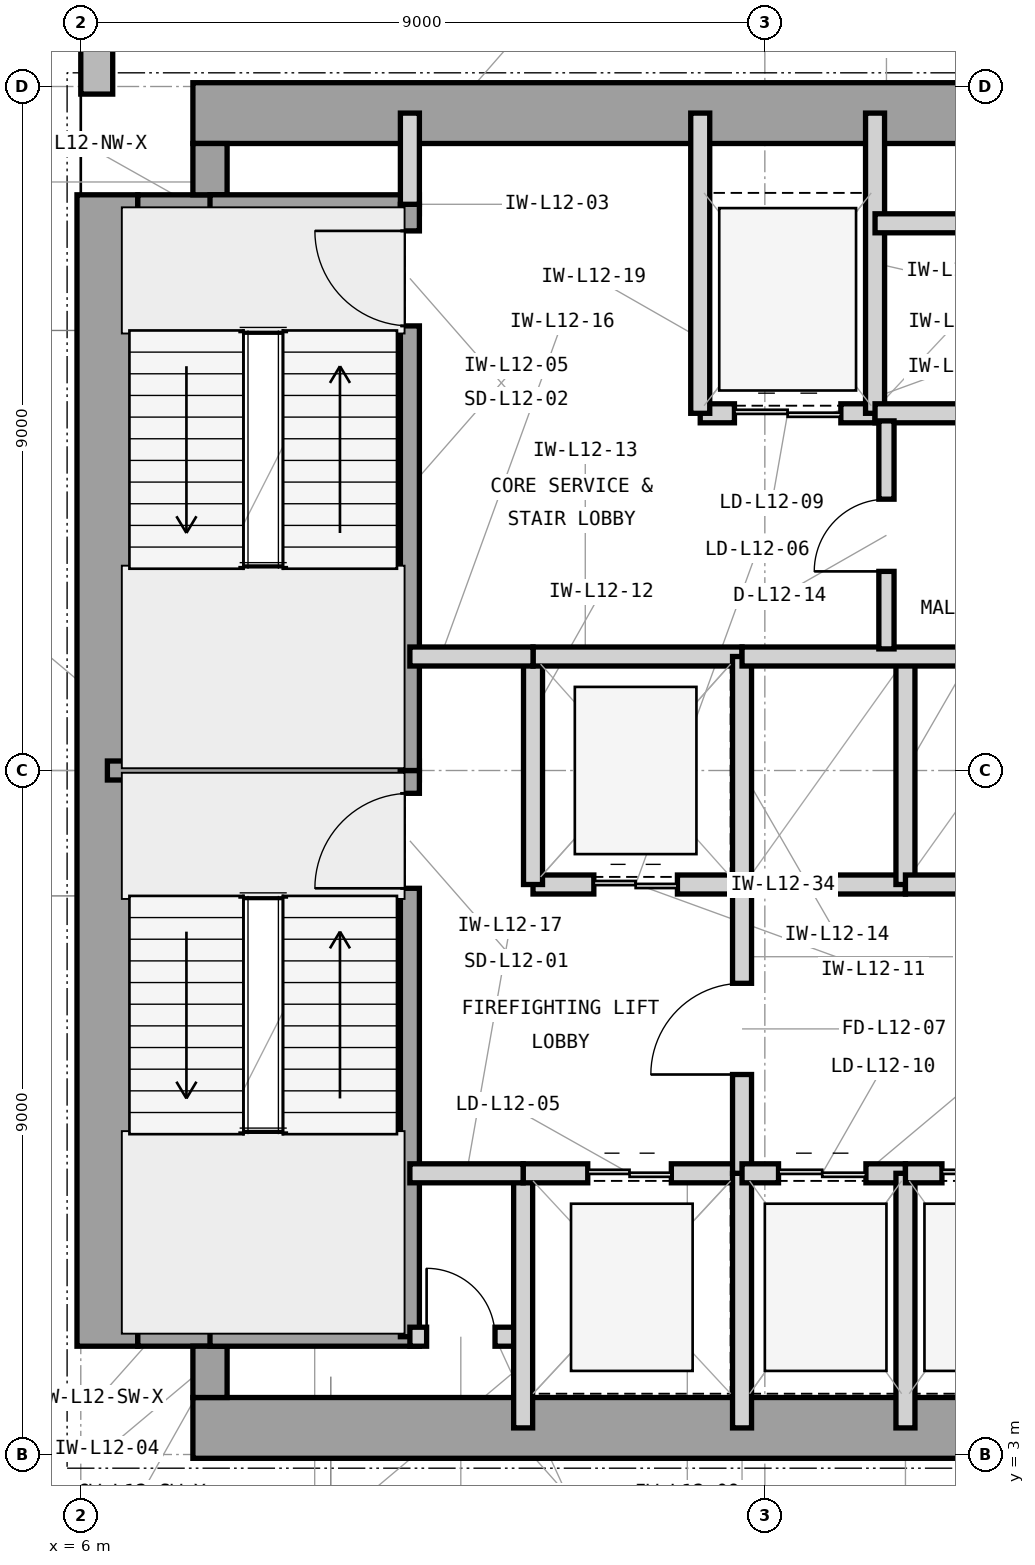
"""IFC4 building model, lengths in metres.
Left out: names, types, materials, properties, quantities, classifications, styles, units other than length and angle.
Written with IfcOpenShell. Run it as: python <this file> out.ifc"""

import sys

from ifc_helpers import new_model, si_unit, direction, frame, frame_2d, origin, place, context, subcontext, project, spatial, rectangle, extrude, element, fill, save


model = new_model("IFC4")
c1 = context("Model", 3, precision=1e-05, world=origin(), true_north=direction((0.0, 1.0)))
c2 = subcontext(c1, "Body", "Model", "MODEL_VIEW")
j1 = project(units=[si_unit("LENGTHUNIT", "METRE"), si_unit("PLANEANGLEUNIT", "RADIAN")], contexts=[c1])
p1 = place(None, origin())
s1 = spatial("IfcSite", under=j1, at=p1, CompositionType="ELEMENT")
p2 = place(p1, origin())
s2 = spatial("IfcBuilding", under=s1, at=p2, CompositionType="ELEMENT")
p3 = place(p2, frame((0.0, 0.0, 55.2)))
s3 = spatial("IfcBuildingStorey", under=s2, at=p3, CompositionType="ELEMENT", Elevation=55.2)
p4 = place(p3, frame((7.475, 3.35, 0.0), z_axis=(0.0, 0.0, 1.0), x_axis=(1.0, 0.0, 0.0)))
e1 = element("IfcWall", 1, at=p4, inside=s3, PredefinedType="SHEAR", context=c2, shape_type="SweptSolid", body=[
    extrude(rectangle(XDim=16.575, YDim=0.8, at=frame_2d((8.288, 0.0))), origin(), (0.0, 0.0, 1.0), 4.2),
])
p5 = place(p3, frame((6.35, 4.425, 0.0), z_axis=(0.0, 0.0, 1.0), x_axis=(0.0, 1.0, 0.0)))
e2 = element("IfcWall", 2, at=p5, inside=s3, PredefinedType="SHEAR", context=c2, shape_type="SweptSolid", body=[
    extrude(rectangle(XDim=15.15, YDim=0.8, at=frame_2d((7.575, 0.0))), origin(), (0.0, 0.0, 1.0), 4.2),
])
p6 = place(p3, frame((7.475, 20.65, 0.0), z_axis=(0.0, 0.0, 1.0), x_axis=(1.0, 0.0, 0.0)))
e3 = element("IfcWall", 3, at=p6, inside=s3, PredefinedType="SHEAR", context=c2, shape_type="SweptSolid", body=[
    extrude(rectangle(XDim=12.325, YDim=0.8, at=frame_2d((6.163, 0.0))), origin(), (0.0, 0.0, 1.0), 4.2),
])
p7 = place(p3, frame((6.75, 4.65, 0.0), z_axis=(0.0, 0.0, 1.0), x_axis=(1.0, 0.0, 0.0)))
e4 = element("IfcWall", 4, at=p7, inside=s3, PredefinedType="SHEAR", context=c2, shape_type="SweptSolid", body=[
    extrude(rectangle(XDim=1.175, YDim=0.45, at=frame_2d((0.587, 0.0))), origin(), (0.0, 0.0, 1.0), 4.2),
])
p8 = place(p3, frame((7.7, 3.75, 0.0), z_axis=(0.0, 0.0, 1.0), x_axis=(0.0, 1.0, 0.0)))
e5 = element("IfcWall", 5, at=p8, inside=s3, PredefinedType="SHEAR", context=c2, shape_type="SweptSolid", body=[
    extrude(rectangle(XDim=0.675, YDim=0.45, at=frame_2d((0.337, 0.0))), origin(), (0.0, 0.0, 1.0), 4.2),
])
p9 = place(p3, frame((6.75, 19.35, 0.0), z_axis=(0.0, 0.0, 1.0), x_axis=(1.0, 0.0, 0.0)))
e6 = element("IfcWall", 6, at=p9, inside=s3, PredefinedType="SHEAR", context=c2, shape_type="SweptSolid", body=[
    extrude(rectangle(XDim=1.175, YDim=0.45, at=frame_2d((0.587, 0.0))), origin(), (0.0, 0.0, 1.0), 4.2),
])
p10 = place(p3, frame((7.7, 19.575, 0.0), z_axis=(0.0, 0.0, 1.0), x_axis=(0.0, 1.0, 0.0)))
e7 = element("IfcWall", 7, at=p10, inside=s3, PredefinedType="SHEAR", context=c2, shape_type="SweptSolid", body=[
    extrude(rectangle(XDim=0.675, YDim=0.45, at=frame_2d((0.337, 0.0))), origin(), (0.0, 0.0, 1.0), 4.2),
])
p11 = place(p3, frame((6.21, 49.4, 0.0), z_axis=(0.0, 0.0, 1.0), x_axis=(0.0, -1.0, 0.0)))
e8 = element("IfcWall", 8, at=p11, inside=s3, PredefinedType="STANDARD", context=c2, shape_type="SweptSolid", body=[
    extrude(rectangle(XDim=28.5, YDim=0.42, at=frame_2d((14.25, 0.0))), origin(), (0.0, 0.0, 1.0), 3.98),
])
p12 = place(p11, frame((15.225, 0.0, 0.85)))
e9 = element("IfcOpeningElement", 9, at=p12, cuts=e8, PredefinedType="OPENING", context=c2, shape_type="SweptSolid", body=[
    extrude(rectangle(XDim=2.8, YDim=2.45, at=frame_2d((1.4, 1.225))), frame((0.0, 0.22, 0.0), z_axis=(0.0, -1.0, 0.0), x_axis=(1.0, 0.0, 0.0)), (0.0, 0.0, 1.0), 0.44),
])
p13 = place(p11, frame((8.436, 0.0, 0.85)))
e10 = element("IfcOpeningElement", 10, at=p13, cuts=e8, PredefinedType="OPENING", context=c2, shape_type="SweptSolid", body=[
    extrude(rectangle(XDim=1.2, YDim=2.45, at=frame_2d((0.6, 1.225))), frame((0.0, 0.22, 0.0), z_axis=(0.0, -1.0, 0.0), x_axis=(1.0, 0.0, 0.0)), (0.0, 0.0, 1.0), 0.44),
])
p14 = place(p3, frame((6.35, 12.0, 0.0), z_axis=(0.0, 0.0, 1.0), x_axis=(1.0, 0.0, 0.0)))
e11 = element("IfcWall", 11, at=p14, inside=s3, PredefinedType="SHEAR", context=c2, shape_type="SweptSolid", body=[
    extrude(rectangle(XDim=4.105, YDim=0.25, at=frame_2d((2.052, 0.0))), origin(), (0.0, 0.0, 1.0), 4.2),
])
for number, where, z_axis, x_axis in (
    (12, (7.7, 4.55, 0.0), (0.0, 0.0, 1.0), (1.0, 0.0, 0.0)),
    (13, (7.7, 19.45, 0.0), (0.0, 0.0, 1.0), (1.0, 0.0, 0.0)),
):
    element("IfcWall", number, at=place(p3, frame(where, z_axis=z_axis, x_axis=x_axis)), inside=s3, PredefinedType="SHEAR", context=c2, shape_type="SweptSolid", body=[
        extrude(rectangle(XDim=2.755, YDim=0.25, at=frame_2d((1.377, 0.0))), origin(), (0.0, 0.0, 1.0), 4.2),
    ])
p15 = place(p3, frame((10.33, 4.55, 0.0), z_axis=(0.0, 0.0, 1.0), x_axis=(0.0, 1.0, 0.0)))
e14 = element("IfcWall", 14, at=p15, inside=s3, PredefinedType="SHEAR", context=c2, shape_type="SweptSolid", body=[
    extrude(rectangle(XDim=7.45, YDim=0.25, at=frame_2d((3.725, 0.0))), origin(), (0.0, 0.0, 1.0), 4.2),
])
p16 = place(p15, frame((5.9, 0.0, 0.0)))
e15 = element("IfcOpeningElement", 15, at=p16, cuts=e14, PredefinedType="OPENING", context=c2, shape_type="SweptSolid", body=[
    extrude(rectangle(XDim=1.25, YDim=2.2, at=frame_2d((0.625, 1.1))), frame((0.0, 0.135, 0.0), z_axis=(0.0, -1.0, 0.0), x_axis=(1.0, 0.0, 0.0)), (0.0, 0.0, 1.0), 0.27),
])
p17 = place(p3, frame((10.33, 12.0, 0.0), z_axis=(0.0, 0.0, 1.0), x_axis=(0.0, 1.0, 0.0)))
e16 = element("IfcWall", 16, at=p17, inside=s3, PredefinedType="SHEAR", context=c2, shape_type="SweptSolid", body=[
    extrude(rectangle(XDim=7.45, YDim=0.25, at=frame_2d((3.725, 0.0))), origin(), (0.0, 0.0, 1.0), 4.2),
])
p18 = place(p17, frame((5.85, 0.0, 0.0)))
e17 = element("IfcOpeningElement", 17, at=p18, cuts=e16, PredefinedType="OPENING", context=c2, shape_type="SweptSolid", body=[
    extrude(rectangle(XDim=1.25, YDim=2.2, at=frame_2d((0.625, 1.1))), frame((0.0, 0.135, 0.0), z_axis=(0.0, -1.0, 0.0), x_axis=(1.0, 0.0, 0.0)), (0.0, 0.0, 1.0), 0.27),
])
p19 = place(p3, frame((10.33, 4.55, 0.0), z_axis=(0.0, 0.0, 1.0), x_axis=(1.0, 0.0, 0.0)))
e18 = element("IfcWall", 18, at=p19, inside=s3, PredefinedType="PARTITIONING", context=c2, shape_type="SweptSolid", body=[
    extrude(rectangle(XDim=1.49, YDim=0.25, at=frame_2d((0.745, 0.0))), origin(), (0.0, 0.0, 1.0), 3.97),
])
p20 = place(p19, frame((0.22, 0.0, 0.0)))
e19 = element("IfcOpeningElement", 19, at=p20, cuts=e18, PredefinedType="OPENING", context=c2, shape_type="SweptSolid", body=[
    extrude(rectangle(XDim=0.9, YDim=2.1, at=frame_2d((0.45, 1.05))), frame((0.0, 0.135, 0.0), z_axis=(0.0, -1.0, 0.0), x_axis=(1.0, 0.0, 0.0)), (0.0, 0.0, 1.0), 0.27),
])
p21 = place(p3, frame((11.82, 3.35, 0.0), z_axis=(0.0, 0.0, 1.0), x_axis=(0.0, 1.0, 0.0)))
e20 = element("IfcWall", 20, at=p21, inside=s3, PredefinedType="PARTITIONING", context=c2, shape_type="SweptSolid", body=[
    extrude(rectangle(XDim=3.35, YDim=0.25, at=frame_2d((1.675, 0.0))), origin(), (0.0, 0.0, 1.0), 3.97),
])
p22 = place(p3, frame((10.33, 19.45, 0.0), z_axis=(0.0, 0.0, 1.0), x_axis=(0.0, 1.0, 0.0)))
e21 = element("IfcWall", 21, at=p22, inside=s3, PredefinedType="PARTITIONING", context=c2, shape_type="SweptSolid", body=[
    extrude(rectangle(XDim=1.2, YDim=0.25, at=frame_2d((0.6, 0.0))), origin(), (0.0, 0.0, 1.0), 3.114),
])
p23 = place(p3, frame((11.82, 6.7, 0.0), z_axis=(0.0, 0.0, 1.0), x_axis=(1.0, 0.0, 0.0)))
e22 = element("IfcWall", 22, at=p23, inside=s3, PredefinedType="PARTITIONING", context=c2, shape_type="SweptSolid", body=[
    extrude(rectangle(XDim=2.88, YDim=0.25, at=frame_2d((1.44, 0.0))), origin(), (0.0, 0.0, 1.0), 3.426),
])
p24 = place(p23, frame((0.85, 0.0, 0.0)))
e23 = element("IfcOpeningElement", 23, at=p24, cuts=e22, PredefinedType="OPENING", context=c2, shape_type="SweptSolid", body=[
    extrude(rectangle(XDim=1.1, YDim=2.25, at=frame_2d((0.55, 1.125))), frame((0.0, 0.135, 0.0), z_axis=(0.0, -1.0, 0.0), x_axis=(1.0, 0.0, 0.0)), (0.0, 0.0, 1.0), 0.27),
])
p25 = place(p3, frame((14.7, 3.35, 0.0), z_axis=(0.0, 0.0, 1.0), x_axis=(0.0, 1.0, 0.0)))
e24 = element("IfcWall", 24, at=p25, inside=s3, PredefinedType="PARTITIONING", context=c2, shape_type="SweptSolid", body=[
    extrude(rectangle(XDim=3.35, YDim=0.25, at=frame_2d((1.675, 0.0))), origin(), (0.0, 0.0, 1.0), 3.97),
])
p26 = place(p3, frame((11.95, 10.5, 0.0), z_axis=(0.0, 0.0, 1.0), x_axis=(1.0, 0.0, 0.0)))
e25 = element("IfcWall", 25, at=p26, inside=s3, PredefinedType="PARTITIONING", context=c2, shape_type="SweptSolid", body=[
    extrude(rectangle(XDim=2.75, YDim=0.25, at=frame_2d((1.375, 0.0))), origin(), (0.0, 0.0, 1.0), 3.426),
])
p27 = place(p26, frame((0.8, 0.0, 0.0)))
e26 = element("IfcOpeningElement", 26, at=p27, cuts=e25, PredefinedType="OPENING", context=c2, shape_type="SweptSolid", body=[
    extrude(rectangle(XDim=1.1, YDim=2.25, at=frame_2d((0.55, 1.125))), frame((0.0, 0.135, 0.0), z_axis=(0.0, -1.0, 0.0), x_axis=(1.0, 0.0, 0.0)), (0.0, 0.0, 1.0), 0.27),
])
p28 = place(p3, frame((11.95, 10.5, 0.0), z_axis=(0.0, 0.0, 1.0), x_axis=(0.0, 1.0, 0.0)))
e27 = element("IfcWall", 27, at=p28, inside=s3, PredefinedType="PARTITIONING", context=c2, shape_type="SweptSolid", body=[
    extrude(rectangle(XDim=3.0, YDim=0.25, at=frame_2d((1.5, 0.0))), origin(), (0.0, 0.0, 1.0), 3.97),
])
p29 = place(p3, frame((11.95, 13.5, 0.0), z_axis=(0.0, 0.0, 1.0), x_axis=(1.0, 0.0, 0.0)))
e28 = element("IfcWall", 28, at=p29, inside=s3, PredefinedType="PARTITIONING", context=c2, shape_type="SweptSolid", body=[
    extrude(rectangle(XDim=2.75, YDim=0.25, at=frame_2d((1.375, 0.0))), origin(), (0.0, 0.0, 1.0), 3.426),
])
p30 = place(p3, frame((14.7, 10.5, 0.0), z_axis=(0.0, 0.0, 1.0), x_axis=(0.0, 1.0, 0.0)))
e29 = element("IfcWall", 29, at=p30, inside=s3, PredefinedType="PARTITIONING", context=c2, shape_type="SweptSolid", body=[
    extrude(rectangle(XDim=3.0, YDim=0.25, at=frame_2d((1.5, 0.0))), origin(), (0.0, 0.0, 1.0), 3.97),
])
p31 = place(p3, frame((14.7, 6.7, 0.0), z_axis=(0.0, 0.0, 1.0), x_axis=(0.0, 1.0, 0.0)))
e30 = element("IfcWall", 30, at=p31, inside=s3, PredefinedType="PARTITIONING", context=c2, shape_type="SweptSolid", body=[
    extrude(rectangle(XDim=3.8, YDim=0.25, at=frame_2d((1.9, 0.0))), origin(), (0.0, 0.0, 1.0), 3.97),
])
p32 = place(p31, frame((1.3, 0.0, 0.0)))
e31 = element("IfcOpeningElement", 31, at=p32, cuts=e30, PredefinedType="OPENING", context=c2, shape_type="SweptSolid", body=[
    extrude(rectangle(XDim=1.2, YDim=2.2, at=frame_2d((0.6, 1.1))), frame((0.0, 0.135, 0.0), z_axis=(0.0, -1.0, 0.0), x_axis=(1.0, 0.0, 0.0)), (0.0, 0.0, 1.0), 0.27),
])
p33 = place(p3, frame((10.33, 13.5, 0.0), z_axis=(0.0, 0.0, 1.0), x_axis=(1.0, 0.0, 0.0)))
e32 = element("IfcWall", 32, at=p33, inside=s3, PredefinedType="PARTITIONING", context=c2, shape_type="SweptSolid", body=[
    extrude(rectangle(XDim=1.62, YDim=0.25, at=frame_2d((0.81, 0.0))), origin(), (0.0, 0.0, 1.0), 3.426),
])
p34 = place(p3, frame((10.33, 6.7, 0.0), z_axis=(0.0, 0.0, 1.0), x_axis=(1.0, 0.0, 0.0)))
e33 = element("IfcWall", 33, at=p34, inside=s3, PredefinedType="PARTITIONING", context=c2, shape_type="SweptSolid", body=[
    extrude(rectangle(XDim=1.49, YDim=0.25, at=frame_2d((0.745, 0.0))), origin(), (0.0, 0.0, 1.0), 3.426),
])
p35 = place(p3, frame((14.15, 16.7, 0.0), z_axis=(0.0, 0.0, 1.0), x_axis=(1.0, 0.0, 0.0)))
e34 = element("IfcWall", 34, at=p35, inside=s3, PredefinedType="PARTITIONING", context=c2, shape_type="SweptSolid", body=[
    extrude(rectangle(XDim=2.3, YDim=0.25, at=frame_2d((1.15, 0.0))), origin(), (0.0, 0.0, 1.0), 3.426),
])
p36 = place(p35, frame((0.45, 0.0, 0.0)))
e35 = element("IfcOpeningElement", 35, at=p36, cuts=e34, PredefinedType="OPENING", context=c2, shape_type="SweptSolid", body=[
    extrude(rectangle(XDim=1.4, YDim=2.35, at=frame_2d((0.7, 1.175))), frame((0.0, 0.135, 0.0), z_axis=(0.0, -1.0, 0.0), x_axis=(1.0, 0.0, 0.0)), (0.0, 0.0, 1.0), 0.27),
])
for number, where, z_axis, x_axis in (
    (36, (14.15, 16.7, 0.0), (0.0, 0.0, 1.0), (0.0, 1.0, 0.0)),
    (37, (16.45, 16.7, 0.0), (0.0, 0.0, 1.0), (0.0, 1.0, 0.0)),
):
    element("IfcWall", number, at=place(p3, frame(where, z_axis=z_axis, x_axis=x_axis)), inside=s3, PredefinedType="PARTITIONING", context=c2, shape_type="SweptSolid", body=[
        extrude(rectangle(XDim=3.95, YDim=0.25, at=frame_2d((1.975, 0.0))), origin(), (0.0, 0.0, 1.0), 3.97),
    ])
p37 = place(p3, frame((16.45, 16.7, 0.0), z_axis=(0.0, 0.0, 1.0), x_axis=(1.0, 0.0, 0.0)))
e38 = element("IfcWall", 38, at=p37, inside=s3, PredefinedType="PARTITIONING", context=c2, shape_type="SweptSolid", body=[
    extrude(rectangle(XDim=2.3, YDim=0.25, at=frame_2d((1.15, 0.0))), origin(), (0.0, 0.0, 1.0), 3.426),
])
p38 = place(p3, frame((16.45, 19.2, 0.0), z_axis=(0.0, 0.0, 1.0), x_axis=(1.0, 0.0, 0.0)))
e39 = element("IfcWall", 39, at=p38, inside=s3, PredefinedType="PARTITIONING", context=c2, shape_type="SweptSolid", body=[
    extrude(rectangle(XDim=7.2, YDim=0.25, at=frame_2d((3.6, 0.0))), origin(), (0.0, 0.0, 1.0), 3.97),
])
p39 = place(p3, frame((14.7, 6.7, 0.0), z_axis=(0.0, 0.0, 1.0), x_axis=(1.0, 0.0, 0.0)))
e40 = element("IfcWall", 40, at=p39, inside=s3, PredefinedType="PARTITIONING", context=c2, shape_type="SweptSolid", body=[
    extrude(rectangle(XDim=2.15, YDim=0.25, at=frame_2d((1.075, 0.0))), origin(), (0.0, 0.0, 1.0), 3.426),
])
p40 = place(p39, frame((0.48, 0.0, 0.0)))
e41 = element("IfcOpeningElement", 41, at=p40, cuts=e40, PredefinedType="OPENING", context=c2, shape_type="SweptSolid", body=[
    extrude(rectangle(XDim=1.15, YDim=2.25, at=frame_2d((0.575, 1.125))), frame((0.0, 0.135, 0.0), z_axis=(0.0, -1.0, 0.0), x_axis=(1.0, 0.0, 0.0)), (0.0, 0.0, 1.0), 0.27),
])
p41 = place(p3, frame((16.85, 3.35, 0.0), z_axis=(0.0, 0.0, 1.0), x_axis=(0.0, 1.0, 0.0)))
e42 = element("IfcWall", 42, at=p41, inside=s3, PredefinedType="PARTITIONING", context=c2, shape_type="SweptSolid", body=[
    extrude(rectangle(XDim=3.35, YDim=0.25, at=frame_2d((1.675, 0.0))), origin(), (0.0, 0.0, 1.0), 3.97),
])
p42 = place(p3, frame((16.85, 6.7, 0.0), z_axis=(0.0, 0.0, 1.0), x_axis=(1.0, 0.0, 0.0)))
e43 = element("IfcWall", 43, at=p42, inside=s3, PredefinedType="PARTITIONING", context=c2, shape_type="SweptSolid", body=[
    extrude(rectangle(XDim=2.1, YDim=0.25, at=frame_2d((1.05, 0.0))), origin(), (0.0, 0.0, 1.0), 3.426),
])
p43 = place(p42, frame((0.48, 0.0, 0.0)))
e44 = element("IfcOpeningElement", 44, at=p43, cuts=e43, PredefinedType="OPENING", context=c2, shape_type="SweptSolid", body=[
    extrude(rectangle(XDim=1.15, YDim=2.25, at=frame_2d((0.575, 1.125))), frame((0.0, 0.135, 0.0), z_axis=(0.0, -1.0, 0.0), x_axis=(1.0, 0.0, 0.0)), (0.0, 0.0, 1.0), 0.27),
])
p44 = place(p3, frame((14.7, 10.5, 0.0), z_axis=(0.0, 0.0, 1.0), x_axis=(1.0, 0.0, 0.0)))
e45 = element("IfcWall", 45, at=p44, inside=s3, PredefinedType="PARTITIONING", context=c2, shape_type="SweptSolid", body=[
    extrude(rectangle(XDim=2.15, YDim=0.25, at=frame_2d((1.075, 0.0))), origin(), (0.0, 0.0, 1.0), 3.426),
])
p45 = place(p3, frame((16.85, 10.5, 0.0), z_axis=(0.0, 0.0, 1.0), x_axis=(0.0, 1.0, 0.0)))
e46 = element("IfcWall", 46, at=p45, inside=s3, PredefinedType="PARTITIONING", context=c2, shape_type="SweptSolid", body=[
    extrude(rectangle(XDim=3.0, YDim=0.25, at=frame_2d((1.5, 0.0))), origin(), (0.0, 0.0, 1.0), 3.97),
])
p46 = place(p3, frame((16.85, 10.5, 0.0), z_axis=(0.0, 0.0, 1.0), x_axis=(1.0, 0.0, 0.0)))
e47 = element("IfcWall", 47, at=p46, inside=s3, PredefinedType="PARTITIONING", context=c2, shape_type="SweptSolid", body=[
    extrude(rectangle(XDim=2.1, YDim=0.25, at=frame_2d((1.05, 0.0))), origin(), (0.0, 0.0, 1.0), 3.426),
])
p47 = place(p3, frame((14.7, 13.5, 0.0), z_axis=(0.0, 0.0, 1.0), x_axis=(1.0, 0.0, 0.0)))
e48 = element("IfcWall", 48, at=p47, inside=s3, PredefinedType="PARTITIONING", context=c2, shape_type="SweptSolid", body=[
    extrude(rectangle(XDim=8.95, YDim=0.25, at=frame_2d((4.475, 0.0))), origin(), (0.0, 0.0, 1.0), 3.426),
])
p48 = place(p3, frame((16.6, 13.6, 0.0), z_axis=(0.0, 0.0, 1.0), x_axis=(0.0, 1.0, 0.0)))
e49 = element("IfcWall", 49, at=p48, inside=s3, PredefinedType="PARTITIONING", context=c2, shape_type="SweptSolid", body=[
    extrude(rectangle(XDim=3.0, YDim=0.2, at=frame_2d((1.5, 0.0))), origin(), (0.0, 0.0, 1.0), 3.97),
])
p49 = place(p48, frame((1.02, 0.0, 0.0)))
e50 = element("IfcOpeningElement", 50, at=p49, cuts=e49, PredefinedType="OPENING", context=c2, shape_type="SweptSolid", body=[
    extrude(rectangle(XDim=0.95, YDim=2.1, at=frame_2d((0.475, 1.05))), frame((0.0, 0.11, 0.0), z_axis=(0.0, -1.0, 0.0), x_axis=(1.0, 0.0, 0.0)), (0.0, 0.0, 1.0), 0.22),
])
p50 = place(p16, origin())
e51 = element("IfcDoor", 51, at=p50, inside=s3, OperationType="SINGLE_SWING_LEFT", PredefinedType="DOOR", context=c2, shape_type="SweptSolid", body=[
    extrude(rectangle(XDim=1.25, YDim=2.2, at=frame_2d((0.625, 1.1))), frame((0.0, 0.025, 0.0), z_axis=(0.0, -1.0, 0.0), x_axis=(1.0, 0.0, 0.0)), (0.0, 0.0, 1.0), 0.05),
])
fill(e15, e51)
p51 = place(p18, origin())
e52 = element("IfcDoor", 52, at=p51, inside=s3, OperationType="SINGLE_SWING_RIGHT", PredefinedType="DOOR", context=c2, shape_type="SweptSolid", body=[
    extrude(rectangle(XDim=1.25, YDim=2.2, at=frame_2d((0.625, 1.1))), frame((0.0, 0.025, 0.0), z_axis=(0.0, -1.0, 0.0), x_axis=(1.0, 0.0, 0.0)), (0.0, 0.0, 1.0), 0.05),
])
fill(e17, e52)
p52 = place(p20, origin())
e53 = element("IfcDoor", 53, at=p52, inside=s3, OperationType="SINGLE_SWING_LEFT", PredefinedType="TRAPDOOR", context=c2, shape_type="SweptSolid", body=[
    extrude(rectangle(XDim=0.9, YDim=2.1, at=frame_2d((0.45, 1.05))), frame((0.0, 0.025, 0.0), z_axis=(0.0, -1.0, 0.0), x_axis=(1.0, 0.0, 0.0)), (0.0, 0.0, 1.0), 0.05),
])
fill(e19, e53)
p53 = place(p24, origin())
e54 = element("IfcDoor", 54, at=p53, inside=s3, OperationType="DOUBLE_DOOR_SLIDING", PredefinedType="DOOR", context=c2, shape_type="SweptSolid", body=[
    extrude(rectangle(XDim=1.1, YDim=2.25, at=frame_2d((0.55, 1.125))), frame((0.0, 0.025, 0.0), z_axis=(0.0, -1.0, 0.0), x_axis=(1.0, 0.0, 0.0)), (0.0, 0.0, 1.0), 0.05),
])
fill(e23, e54)
p54 = place(p27, origin())
e55 = element("IfcDoor", 55, at=p54, inside=s3, OperationType="DOUBLE_DOOR_SLIDING", PredefinedType="DOOR", context=c2, shape_type="SweptSolid", body=[
    extrude(rectangle(XDim=1.1, YDim=2.25, at=frame_2d((0.55, 1.125))), frame((0.0, 0.025, 0.0), z_axis=(0.0, -1.0, 0.0), x_axis=(1.0, 0.0, 0.0)), (0.0, 0.0, 1.0), 0.05),
])
fill(e26, e55)
p55 = place(p32, origin())
e56 = element("IfcDoor", 56, at=p55, inside=s3, OperationType="SINGLE_SWING_LEFT", PredefinedType="DOOR", context=c2, shape_type="SweptSolid", body=[
    extrude(rectangle(XDim=1.2, YDim=2.2, at=frame_2d((0.6, 1.1))), frame((0.0, 0.025, 0.0), z_axis=(0.0, -1.0, 0.0), x_axis=(1.0, 0.0, 0.0)), (0.0, 0.0, 1.0), 0.05),
])
fill(e31, e56)
p56 = place(p36, origin())
e57 = element("IfcDoor", 57, at=p56, inside=s3, OperationType="DOUBLE_DOOR_SLIDING", PredefinedType="DOOR", context=c2, shape_type="SweptSolid", body=[
    extrude(rectangle(XDim=1.4, YDim=2.35, at=frame_2d((0.7, 1.175))), frame((0.0, 0.025, 0.0), z_axis=(0.0, -1.0, 0.0), x_axis=(1.0, 0.0, 0.0)), (0.0, 0.0, 1.0), 0.05),
])
fill(e35, e57)
p57 = place(p40, origin())
e58 = element("IfcDoor", 58, at=p57, inside=s3, OperationType="DOUBLE_DOOR_SLIDING", PredefinedType="DOOR", context=c2, shape_type="SweptSolid", body=[
    extrude(rectangle(XDim=1.15, YDim=2.25, at=frame_2d((0.575, 1.125))), frame((0.0, 0.025, 0.0), z_axis=(0.0, -1.0, 0.0), x_axis=(1.0, 0.0, 0.0)), (0.0, 0.0, 1.0), 0.05),
])
fill(e41, e58)
p58 = place(p43, origin())
e59 = element("IfcDoor", 59, at=p58, inside=s3, OperationType="DOUBLE_DOOR_SLIDING", PredefinedType="DOOR", context=c2, shape_type="SweptSolid", body=[
    extrude(rectangle(XDim=1.15, YDim=2.25, at=frame_2d((0.575, 1.125))), frame((0.0, 0.025, 0.0), z_axis=(0.0, -1.0, 0.0), x_axis=(1.0, 0.0, 0.0)), (0.0, 0.0, 1.0), 0.05),
])
fill(e44, e59)
p59 = place(p49, origin())
e60 = element("IfcDoor", 60, at=p59, inside=s3, OperationType="SINGLE_SWING_LEFT", PredefinedType="DOOR", context=c2, shape_type="SweptSolid", body=[
    extrude(rectangle(XDim=0.95, YDim=2.1, at=frame_2d((0.475, 1.05))), frame((0.0, 0.025, 0.0), z_axis=(0.0, -1.0, 0.0), x_axis=(1.0, 0.0, 0.0)), (0.0, 0.0, 1.0), 0.05),
])
fill(e50, e60)
save(model, sys.argv[1])
